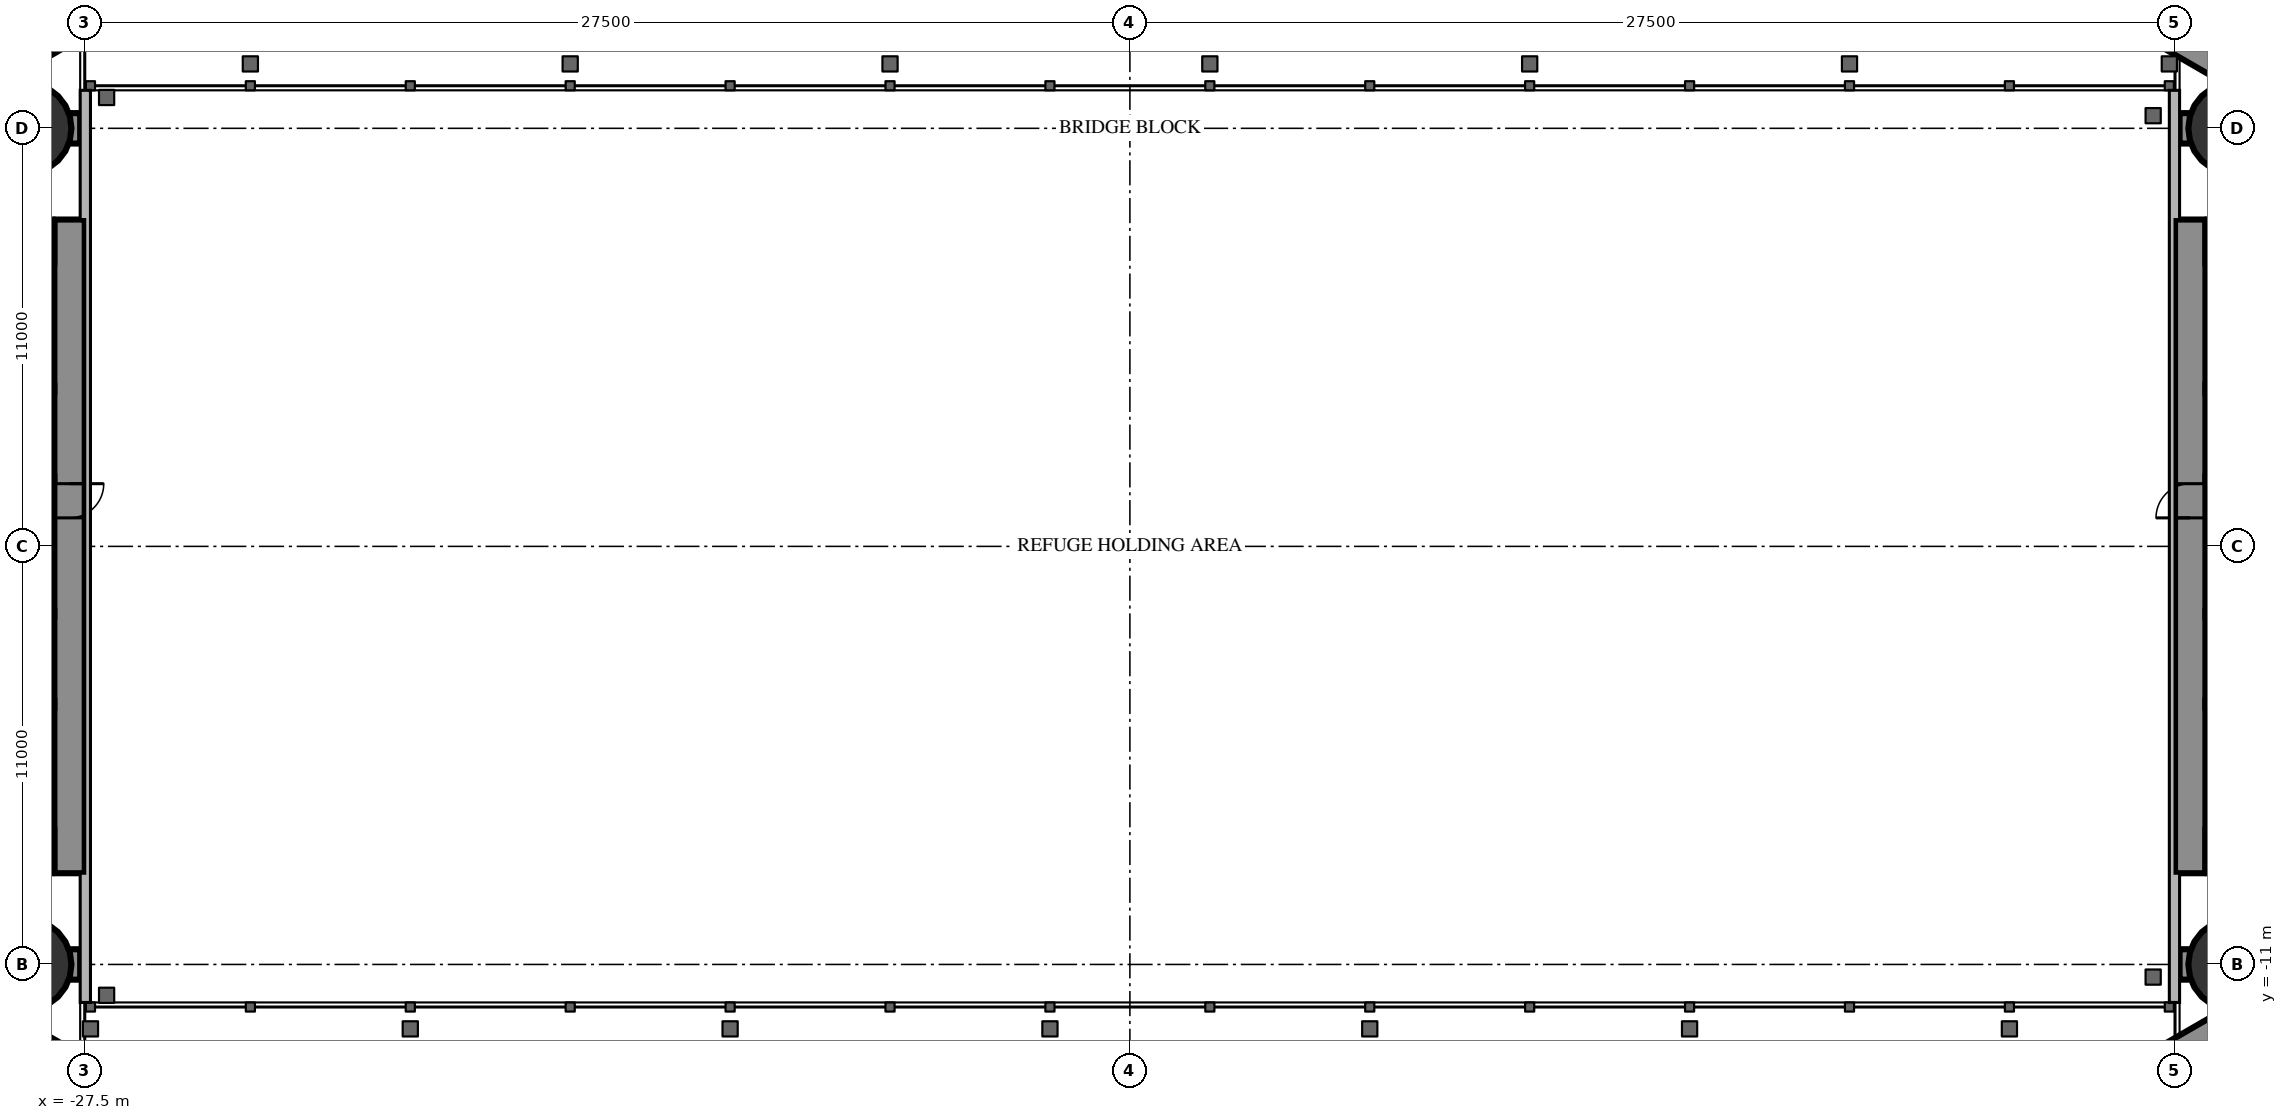
"""IFC4 building model, lengths in metres.
Left out: names, types, materials, properties, quantities, classifications, styles, units other than length and angle.
Written with IfcOpenShell. Run it as: python <this file> out.ifc"""

import sys

from ifc_helpers import new_model, si_unit, direction, frame, frame_2d, origin, origin_2d, place, context, subcontext, project, spatial, rectangle, hollow_circle, extrude, element, fill, save


model = new_model("IFC4")
c1 = context("Model", 3, precision=1e-05, world=origin(), true_north=direction((0.0, 1.0)))
c2 = subcontext(c1, "Body", "Model", "MODEL_VIEW")
j1 = project(units=[si_unit("LENGTHUNIT", "METRE"), si_unit("PLANEANGLEUNIT", "RADIAN")], contexts=[c1])
p1 = place(None, origin())
s1 = spatial("IfcSite", under=j1, at=p1, CompositionType="ELEMENT")
p2 = place(p1, origin())
s2 = spatial("IfcBuilding", under=s1, at=p2, CompositionType="ELEMENT")
p3 = place(p2, frame((0.0, 0.0, 205.3)))
s3 = spatial("IfcBuildingStorey", under=s2, at=p3, CompositionType="ELEMENT", Elevation=205.3)
for number, where, z_axis, x_axis in (
    (1, (-29.05, -11.0, 0.0), (0.0, 0.0, 1.0), (1.0, 0.0, 0.0)),
    (2, (-29.05, 11.0, 0.0), (0.0, 0.0, 1.0), (1.0, 0.0, 0.0)),
):
    element("IfcColumn", number, at=place(p3, frame(where, z_axis=z_axis, x_axis=x_axis)), inside=s3, PredefinedType="COLUMN", context=c2, shape_type="SweptSolid", body=[
        extrude(hollow_circle(Radius=1.2, WallThickness=0.09, at=origin_2d()), origin(), (0.0, 0.0, 1.0), 5.0),
    ])
p4 = place(p3, frame((-27.9, 8.6, 0.0), z_axis=(0.0, 0.0, 1.0), x_axis=(0.0, -1.0, 0.0)))
e3 = element("IfcWall", 3, at=p4, inside=s3, PredefinedType="SHEAR", context=c2, shape_type="SweptSolid", body=[
    extrude(rectangle(XDim=17.2, YDim=0.8, at=frame_2d((8.6, 0.0))), origin(), (0.0, 0.0, 1.0), 5.0),
])
p5 = place(p4, frame((6.95, 0.0, 0.0)))
e4 = element("IfcOpeningElement", 4, at=p5, cuts=e3, PredefinedType="OPENING", context=c2, shape_type="SweptSolid", body=[
    extrude(rectangle(XDim=0.9, YDim=2.2, at=frame_2d((0.45, 1.1))), frame((0.0, 0.41, 0.0), z_axis=(0.0, -1.0, 0.0), x_axis=(1.0, 0.0, 0.0)), (0.0, 0.0, 1.0), 0.82),
])
p6 = place(p3, frame((-28.3, 8.0, 0.0), z_axis=(0.0, 0.0, 1.0), x_axis=(-1.0, 0.0, 0.0)))
e5 = element("IfcWall", 5, at=p6, inside=s3, PredefinedType="SHEAR", context=c2, shape_type="SweptSolid", body=[
    extrude(rectangle(XDim=8.4, YDim=1.2, at=frame_2d((4.2, 0.0))), origin(), (0.0, 0.0, 1.0), 5.0),
])
p7 = place(p6, frame((0.25, 0.0, 0.0)))
e6 = element("IfcOpeningElement", 6, at=p7, cuts=e5, PredefinedType="OPENING", context=c2, shape_type="SweptSolid", body=[
    extrude(rectangle(XDim=1.0, YDim=2.2, at=frame_2d((0.5, 1.1))), frame((0.0, 0.61, 0.0), z_axis=(0.0, -1.0, 0.0), x_axis=(1.0, 0.0, 0.0)), (0.0, 0.0, 1.0), 1.22),
])
p8 = place(p3, frame((-28.3, -8.0, 0.0), z_axis=(0.0, 0.0, 1.0), x_axis=(-1.0, 0.0, 0.0)))
e7 = element("IfcWall", 7, at=p8, inside=s3, PredefinedType="SHEAR", context=c2, shape_type="SweptSolid", body=[
    extrude(rectangle(XDim=8.4, YDim=1.2, at=frame_2d((4.2, 0.0))), origin(), (0.0, 0.0, 1.0), 5.0),
])
p9 = place(p8, frame((0.25, 0.0, 0.0)))
e8 = element("IfcOpeningElement", 8, at=p9, cuts=e7, PredefinedType="OPENING", context=c2, shape_type="SweptSolid", body=[
    extrude(rectangle(XDim=1.0, YDim=2.2, at=frame_2d((0.5, 1.1))), frame((0.0, 0.61, 0.0), z_axis=(0.0, -1.0, 0.0), x_axis=(1.0, 0.0, 0.0)), (0.0, 0.0, 1.0), 1.22),
])
for number, where, z_axis, x_axis in (
    (9, (-28.3, 4.15, 0.0), (0.0, 0.0, 1.0), (-1.0, 0.0, 0.0)),
    (10, (-28.3, -4.15, 0.0), (0.0, 0.0, 1.0), (-1.0, 0.0, 0.0)),
):
    element("IfcWall", number, at=place(p3, frame(where, z_axis=z_axis, x_axis=x_axis)), inside=s3, PredefinedType="SHEAR", context=c2, shape_type="SweptSolid", body=[
        extrude(rectangle(XDim=8.4, YDim=0.3, at=frame_2d((4.2, 0.0))), origin(), (0.0, 0.0, 1.0), 5.0),
    ])
for number, where, z_axis, x_axis in (
    (11, (-28.3, 1.775, 0.0), (0.0, 0.0, 1.0), (-1.0, 0.0, 0.0)),
    (12, (-28.3, -1.775, 0.0), (0.0, 0.0, 1.0), (-1.0, 0.0, 0.0)),
):
    element("IfcWall", number, at=place(p3, frame(where, z_axis=z_axis, x_axis=x_axis)), inside=s3, PredefinedType="SHEAR", context=c2, shape_type="SweptSolid", body=[
        extrude(rectangle(XDim=2.9, YDim=0.25, at=frame_2d((1.45, 0.0))), origin(), (0.0, 0.0, 1.0), 5.0),
    ])
p10 = place(p3, frame((-27.2, 14.3, 0.0), z_axis=(0.0, 0.0, 1.0), x_axis=(-0.866026593062, -0.499997940104, 0.0)))
e13 = element("IfcWall", 13, at=p10, inside=s3, PredefinedType="SHEAR", context=c2, shape_type="SweptSolid", body=[
    extrude(rectangle(XDim=28.946, YDim=1.2, at=frame_2d((14.473, 0.0))), origin(), (0.0, 0.0, 1.0), 5.0),
])
p11 = place(p10, frame((6.5, 0.0, 0.0)))
e14 = element("IfcOpeningElement", 14, at=p11, cuts=e13, PredefinedType="OPENING", context=c2, shape_type="SweptSolid", body=[
    extrude(rectangle(XDim=1.0, YDim=2.2, at=frame_2d((0.5, 1.1))), frame((0.0, 0.61, 0.0), z_axis=(0.0, -1.0, 0.0), x_axis=(1.0, 0.0, 0.0)), (0.0, 0.0, 1.0), 1.22),
])
p12 = place(p10, frame((13.568, 0.0, 0.0)))
e15 = element("IfcOpeningElement", 15, at=p12, cuts=e13, PredefinedType="OPENING", context=c2, shape_type="SweptSolid", body=[
    extrude(rectangle(XDim=1.8, YDim=2.2, at=frame_2d((0.9, 1.1))), frame((0.0, 0.61, 0.0), z_axis=(0.0, -1.0, 0.0), x_axis=(1.0, 0.0, 0.0)), (0.0, 0.0, 1.0), 1.22),
])
p13 = place(p3, frame((-27.2, -14.3, 0.0), z_axis=(0.0, 0.0, 1.0), x_axis=(-0.866024021859, 0.500002393557, 0.0)))
e16 = element("IfcWall", 16, at=p13, inside=s3, PredefinedType="SHEAR", context=c2, shape_type="SweptSolid", body=[
    extrude(rectangle(XDim=27.907, YDim=1.2, at=frame_2d((13.954, 0.0))), origin(), (0.0, 0.0, 1.0), 5.0),
])
p14 = place(p13, frame((6.5, 0.0, 0.0)))
e17 = element("IfcOpeningElement", 17, at=p14, cuts=e16, PredefinedType="OPENING", context=c2, shape_type="SweptSolid", body=[
    extrude(rectangle(XDim=1.0, YDim=2.2, at=frame_2d((0.5, 1.1))), frame((0.0, 0.61, 0.0), z_axis=(0.0, -1.0, 0.0), x_axis=(1.0, 0.0, 0.0)), (0.0, 0.0, 1.0), 1.22),
])
p15 = place(p13, frame((13.568, 0.0, 0.0)))
e18 = element("IfcOpeningElement", 18, at=p15, cuts=e16, PredefinedType="OPENING", context=c2, shape_type="SweptSolid", body=[
    extrude(rectangle(XDim=1.8, YDim=2.2, at=frame_2d((0.9, 1.1))), frame((0.0, 0.61, 0.0), z_axis=(0.0, -1.0, 0.0), x_axis=(1.0, 0.0, 0.0)), (0.0, 0.0, 1.0), 1.22),
])
for number, where, z_axis, x_axis in (
    (19, (-27.62, -11.0, 0.0), (0.0, 0.0, 1.0), (-1.0, 0.0, 0.0)),
    (20, (-27.62, 11.0, 0.0), (0.0, 0.0, 1.0), (-1.0, 0.0, 0.0)),
):
    element("IfcWall", number, at=place(p3, frame(where, z_axis=z_axis, x_axis=x_axis)), inside=s3, PredefinedType="SHEAR", context=c2, shape_type="SweptSolid", body=[
        extrude(rectangle(XDim=4.076, YDim=0.8, at=frame_2d((2.038, 0.0))), origin(), (0.0, 0.0, 1.0), 5.0),
    ])
for number, where, z_axis, x_axis in (
    (21, (29.05, 11.0, 0.0), (0.0, 0.0, 1.0), (1.0, 0.0, 0.0)),
    (22, (29.05, -11.0, 0.0), (0.0, 0.0, 1.0), (1.0, 0.0, 0.0)),
):
    element("IfcColumn", number, at=place(p3, frame(where, z_axis=z_axis, x_axis=x_axis)), inside=s3, PredefinedType="COLUMN", context=c2, shape_type="SweptSolid", body=[
        extrude(hollow_circle(Radius=1.2, WallThickness=0.09, at=origin_2d()), origin(), (0.0, 0.0, 1.0), 5.0),
    ])
p16 = place(p3, frame((27.9, -8.6, 0.0), z_axis=(0.0, 0.0, 1.0), x_axis=(0.0, 1.0, 0.0)))
e23 = element("IfcWall", 23, at=p16, inside=s3, PredefinedType="SHEAR", context=c2, shape_type="SweptSolid", body=[
    extrude(rectangle(XDim=17.2, YDim=0.8, at=frame_2d((8.6, 0.0))), origin(), (0.0, 0.0, 1.0), 5.0),
])
p17 = place(p16, frame((9.35, 0.0, 0.0)))
e24 = element("IfcOpeningElement", 24, at=p17, cuts=e23, PredefinedType="OPENING", context=c2, shape_type="SweptSolid", body=[
    extrude(rectangle(XDim=0.9, YDim=2.2, at=frame_2d((0.45, 1.1))), frame((0.0, 0.41, 0.0), z_axis=(0.0, -1.0, 0.0), x_axis=(1.0, 0.0, 0.0)), (0.0, 0.0, 1.0), 0.82),
])
p18 = place(p3, frame((28.3, -8.0, 0.0), z_axis=(0.0, 0.0, 1.0), x_axis=(1.0, 0.0, 0.0)))
e25 = element("IfcWall", 25, at=p18, inside=s3, PredefinedType="SHEAR", context=c2, shape_type="SweptSolid", body=[
    extrude(rectangle(XDim=8.4, YDim=1.2, at=frame_2d((4.2, 0.0))), origin(), (0.0, 0.0, 1.0), 5.0),
])
p19 = place(p18, frame((0.25, 0.0, 0.0)))
e26 = element("IfcOpeningElement", 26, at=p19, cuts=e25, PredefinedType="OPENING", context=c2, shape_type="SweptSolid", body=[
    extrude(rectangle(XDim=1.0, YDim=2.2, at=frame_2d((0.5, 1.1))), frame((0.0, 0.61, 0.0), z_axis=(0.0, -1.0, 0.0), x_axis=(1.0, 0.0, 0.0)), (0.0, 0.0, 1.0), 1.22),
])
p20 = place(p3, frame((28.3, 8.0, 0.0), z_axis=(0.0, 0.0, 1.0), x_axis=(1.0, 0.0, 0.0)))
e27 = element("IfcWall", 27, at=p20, inside=s3, PredefinedType="SHEAR", context=c2, shape_type="SweptSolid", body=[
    extrude(rectangle(XDim=8.4, YDim=1.2, at=frame_2d((4.2, 0.0))), origin(), (0.0, 0.0, 1.0), 5.0),
])
p21 = place(p20, frame((0.25, 0.0, 0.0)))
e28 = element("IfcOpeningElement", 28, at=p21, cuts=e27, PredefinedType="OPENING", context=c2, shape_type="SweptSolid", body=[
    extrude(rectangle(XDim=1.0, YDim=2.2, at=frame_2d((0.5, 1.1))), frame((0.0, 0.61, 0.0), z_axis=(0.0, -1.0, 0.0), x_axis=(1.0, 0.0, 0.0)), (0.0, 0.0, 1.0), 1.22),
])
for number, where, z_axis, x_axis in (
    (29, (28.3, -4.15, 0.0), (0.0, 0.0, 1.0), (1.0, 0.0, 0.0)),
    (30, (28.3, 4.15, 0.0), (0.0, 0.0, 1.0), (1.0, 0.0, 0.0)),
):
    element("IfcWall", number, at=place(p3, frame(where, z_axis=z_axis, x_axis=x_axis)), inside=s3, PredefinedType="SHEAR", context=c2, shape_type="SweptSolid", body=[
        extrude(rectangle(XDim=8.4, YDim=0.3, at=frame_2d((4.2, 0.0))), origin(), (0.0, 0.0, 1.0), 5.0),
    ])
for number, where, z_axis, x_axis in (
    (31, (28.3, -1.775, 0.0), (0.0, 0.0, 1.0), (1.0, 0.0, 0.0)),
    (32, (28.3, 1.775, 0.0), (0.0, 0.0, 1.0), (1.0, 0.0, 0.0)),
):
    element("IfcWall", number, at=place(p3, frame(where, z_axis=z_axis, x_axis=x_axis)), inside=s3, PredefinedType="SHEAR", context=c2, shape_type="SweptSolid", body=[
        extrude(rectangle(XDim=2.9, YDim=0.25, at=frame_2d((1.45, 0.0))), origin(), (0.0, 0.0, 1.0), 5.0),
    ])
p22 = place(p3, frame((27.2, -13.8, 0.0), z_axis=(0.0, 0.0, 1.0), x_axis=(0.866027159892, 0.499996958321, 0.0)))
e33 = element("IfcWall", 33, at=p22, inside=s3, PredefinedType="SHEAR", context=c2, shape_type="SweptSolid", body=[
    extrude(rectangle(XDim=27.947, YDim=1.2, at=frame_2d((13.973, 0.0))), origin(), (0.0, 0.0, 1.0), 5.0),
])
p23 = place(p22, frame((6.5, 0.0, 0.0)))
e34 = element("IfcOpeningElement", 34, at=p23, cuts=e33, PredefinedType="OPENING", context=c2, shape_type="SweptSolid", body=[
    extrude(rectangle(XDim=1.0, YDim=2.2, at=frame_2d((0.5, 1.1))), frame((0.0, 0.61, 0.0), z_axis=(0.0, -1.0, 0.0), x_axis=(1.0, 0.0, 0.0)), (0.0, 0.0, 1.0), 1.22),
])
p24 = place(p22, frame((13.568, 0.0, 0.0)))
e35 = element("IfcOpeningElement", 35, at=p24, cuts=e33, PredefinedType="OPENING", context=c2, shape_type="SweptSolid", body=[
    extrude(rectangle(XDim=1.8, YDim=2.2, at=frame_2d((0.9, 1.1))), frame((0.0, 0.61, 0.0), z_axis=(0.0, -1.0, 0.0), x_axis=(1.0, 0.0, 0.0)), (0.0, 0.0, 1.0), 1.22),
])
p25 = place(p3, frame((27.2, 13.8, 0.0), z_axis=(0.0, 0.0, 1.0), x_axis=(0.866024515034, -0.500001539357, 0.0)))
e36 = element("IfcWall", 36, at=p25, inside=s3, PredefinedType="SHEAR", context=c2, shape_type="SweptSolid", body=[
    extrude(rectangle(XDim=26.907, YDim=1.2, at=frame_2d((13.454, 0.0))), origin(), (0.0, 0.0, 1.0), 5.0),
])
p26 = place(p25, frame((6.5, 0.0, 0.0)))
e37 = element("IfcOpeningElement", 37, at=p26, cuts=e36, PredefinedType="OPENING", context=c2, shape_type="SweptSolid", body=[
    extrude(rectangle(XDim=1.0, YDim=2.2, at=frame_2d((0.5, 1.1))), frame((0.0, 0.61, 0.0), z_axis=(0.0, -1.0, 0.0), x_axis=(1.0, 0.0, 0.0)), (0.0, 0.0, 1.0), 1.22),
])
p27 = place(p25, frame((13.568, 0.0, 0.0)))
e38 = element("IfcOpeningElement", 38, at=p27, cuts=e36, PredefinedType="OPENING", context=c2, shape_type="SweptSolid", body=[
    extrude(rectangle(XDim=1.8, YDim=2.2, at=frame_2d((0.9, 1.1))), frame((0.0, 0.61, 0.0), z_axis=(0.0, -1.0, 0.0), x_axis=(1.0, 0.0, 0.0)), (0.0, 0.0, 1.0), 1.22),
])
for number, where, z_axis, x_axis in (
    (39, (27.62, -11.0, 0.0), (0.0, 0.0, 1.0), (1.0, 0.0, 0.0)),
    (40, (27.62, 11.0, 0.0), (0.0, 0.0, 1.0), (1.0, 0.0, 0.0)),
):
    element("IfcWall", number, at=place(p3, frame(where, z_axis=z_axis, x_axis=x_axis)), inside=s3, PredefinedType="SHEAR", context=c2, shape_type="SweptSolid", body=[
        extrude(rectangle(XDim=3.209, YDim=0.8, at=frame_2d((1.605, 0.0))), origin(), (0.0, 0.0, 1.0), 5.0),
    ])
p28 = place(p3, frame((-27.86, 16.575, 0.0), z_axis=(0.0, 0.0, 1.0), x_axis=(-0.866025533911, -0.499999774615, 0.0)))
e41 = element("IfcWall", 41, at=p28, inside=s3, PredefinedType="PARTITIONING", context=c2, shape_type="SweptSolid", body=[
    extrude(rectangle(XDim=33.149, YDim=0.2, at=frame_2d((16.575, 0.0))), origin(), (0.0, 0.0, 1.0), 4.75),
])
p29 = place(p28, frame((6.051, 0.0, 0.0)))
e42 = element("IfcOpeningElement", 42, at=p29, cuts=e41, PredefinedType="OPENING", context=c2, shape_type="SweptSolid", body=[
    extrude(rectangle(XDim=1.8, YDim=2.2, at=frame_2d((0.9, 1.1))), frame((0.0, 0.11, 0.0), z_axis=(0.0, -1.0, 0.0), x_axis=(1.0, 0.0, 0.0)), (0.0, 0.0, 1.0), 0.22),
])
p30 = place(p28, frame((16.234, 0.0, 0.0)))
e43 = element("IfcOpeningElement", 43, at=p30, cuts=e41, PredefinedType="OPENING", context=c2, shape_type="SweptSolid", body=[
    extrude(rectangle(XDim=2.0, YDim=2.4, at=frame_2d((1.0, 1.2))), frame((0.0, 0.11, 0.0), z_axis=(0.0, -1.0, 0.0), x_axis=(1.0, 0.0, 0.0)), (0.0, 0.0, 1.0), 0.22),
])
p31 = place(p28, frame((26.082, 0.0, 0.0)))
e44 = element("IfcOpeningElement", 44, at=p31, cuts=e41, PredefinedType="OPENING", context=c2, shape_type="SweptSolid", body=[
    extrude(rectangle(XDim=2.0, YDim=2.4, at=frame_2d((1.0, 1.2))), frame((0.0, 0.11, 0.0), z_axis=(0.0, -1.0, 0.0), x_axis=(1.0, 0.0, 0.0)), (0.0, 0.0, 1.0), 0.22),
])
p32 = place(p3, frame((-27.86, -16.575, 0.0), z_axis=(0.0, 0.0, 1.0), x_axis=(-0.866027756871, 0.499995924312, 0.0)))
e45 = element("IfcWall", 45, at=p32, inside=s3, PredefinedType="PARTITIONING", context=c2, shape_type="SweptSolid", body=[
    extrude(rectangle(XDim=12.622, YDim=0.2, at=frame_2d((6.311, 0.0))), origin(), (0.0, 0.0, 1.0), 4.75),
])
p33 = place(p32, frame((5.411, 0.0, 0.0)))
e46 = element("IfcOpeningElement", 46, at=p33, cuts=e45, PredefinedType="OPENING", context=c2, shape_type="SweptSolid", body=[
    extrude(rectangle(XDim=1.8, YDim=2.2, at=frame_2d((0.9, 1.1))), frame((0.0, 0.11, 0.0), z_axis=(0.0, -1.0, 0.0), x_axis=(1.0, 0.0, 0.0)), (0.0, 0.0, 1.0), 0.22),
])
p34 = place(p3, frame((27.959, 16.017, 0.0), z_axis=(0.0, 0.0, 1.0), x_axis=(0.866027146794, -0.499996981007, 0.0)))
e47 = element("IfcWall", 47, at=p34, inside=s3, PredefinedType="PARTITIONING", context=c2, shape_type="SweptSolid", body=[
    extrude(rectangle(XDim=21.657, YDim=0.2, at=frame_2d((10.829, 0.0))), origin(), (0.0, 0.0, 1.0), 4.75),
])
p35 = place(p34, frame((15.57, 0.0, 0.0)))
e48 = element("IfcOpeningElement", 48, at=p35, cuts=e47, PredefinedType="OPENING", context=c2, shape_type="SweptSolid", body=[
    extrude(rectangle(XDim=1.8, YDim=2.2, at=frame_2d((0.9, 1.1))), frame((0.0, 0.11, 0.0), z_axis=(0.0, -1.0, 0.0), x_axis=(1.0, 0.0, 0.0)), (0.0, 0.0, 1.0), 0.22),
])
p36 = place(p34, frame((6.579, 0.0, 0.0)))
e49 = element("IfcOpeningElement", 49, at=p36, cuts=e47, PredefinedType="OPENING", context=c2, shape_type="SweptSolid", body=[
    extrude(rectangle(XDim=1.8, YDim=2.2, at=frame_2d((0.9, 1.1))), frame((0.0, 0.11, 0.0), z_axis=(0.0, -1.0, 0.0), x_axis=(1.0, 0.0, 0.0)), (0.0, 0.0, 1.0), 0.22),
])
p37 = place(p3, frame((27.959, -16.017, 0.0), z_axis=(0.0, 0.0, 1.0), x_axis=(0.866026253963, 0.499998527445, 0.0)))
e50 = element("IfcWall", 50, at=p37, inside=s3, PredefinedType="PARTITIONING", context=c2, shape_type="SweptSolid", body=[
    extrude(rectangle(XDim=24.241, YDim=0.2, at=frame_2d((12.12, 0.0))), origin(), (0.0, 0.0, 1.0), 4.75),
])
p38 = place(p37, frame((6.579, 0.0, 0.0)))
e51 = element("IfcOpeningElement", 51, at=p38, cuts=e50, PredefinedType="OPENING", context=c2, shape_type="SweptSolid", body=[
    extrude(rectangle(XDim=1.8, YDim=2.2, at=frame_2d((0.9, 1.1))), frame((0.0, 0.11, 0.0), z_axis=(0.0, -1.0, 0.0), x_axis=(1.0, 0.0, 0.0)), (0.0, 0.0, 1.0), 0.22),
])
p39 = place(p37, frame((17.612, 0.0, 0.0)))
e52 = element("IfcOpeningElement", 52, at=p39, cuts=e50, PredefinedType="OPENING", context=c2, shape_type="SweptSolid", body=[
    extrude(rectangle(XDim=2.0, YDim=2.4, at=frame_2d((1.0, 1.2))), frame((0.0, 0.11, 0.0), z_axis=(0.0, -1.0, 0.0), x_axis=(1.0, 0.0, 0.0)), (0.0, 0.0, 1.0), 0.22),
])
p40 = place(p5, origin())
e53 = element("IfcDoor", 53, at=p40, inside=s3, OperationType="SINGLE_SWING_LEFT", PredefinedType="DOOR", context=c2, shape_type="SweptSolid", body=[
    extrude(rectangle(XDim=0.9, YDim=2.2, at=frame_2d((0.45, 1.1))), frame((0.0, 0.025, 0.0), z_axis=(0.0, -1.0, 0.0), x_axis=(1.0, 0.0, 0.0)), (0.0, 0.0, 1.0), 0.05),
])
fill(e4, e53)
p41 = place(p17, origin())
e54 = element("IfcDoor", 54, at=p41, inside=s3, OperationType="SINGLE_SWING_LEFT", PredefinedType="DOOR", context=c2, shape_type="SweptSolid", body=[
    extrude(rectangle(XDim=0.9, YDim=2.2, at=frame_2d((0.45, 1.1))), frame((0.0, 0.025, 0.0), z_axis=(0.0, -1.0, 0.0), x_axis=(1.0, 0.0, 0.0)), (0.0, 0.0, 1.0), 0.05),
])
fill(e24, e54)
save(model, sys.argv[1])
